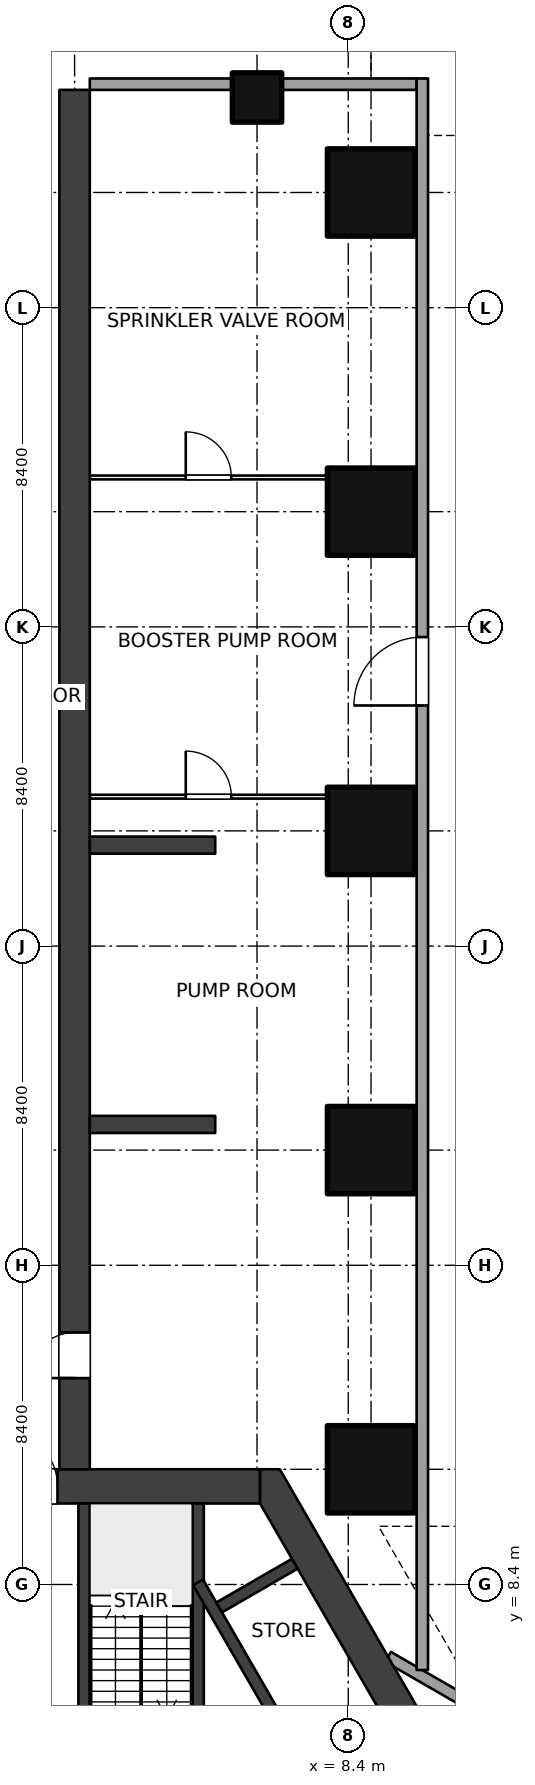
"""IFC4 building model, lengths in metres.
Left out: names, types, materials, properties, quantities, classifications, styles, units other than length and angle.
Written with IfcOpenShell. Run it as: python <this file> out.ifc"""

import sys

from ifc_helpers import new_model, si_unit, direction, frame, frame_2d, origin, origin_2d, place, context, subcontext, project, spatial, polyline, rectangle, outline, extrude, element, fill, save


model = new_model("IFC4")
c1 = context("Model", 3, precision=1e-05, world=origin(), true_north=direction((0.0, 1.0)))
c2 = subcontext(c1, "Body", "Model", "MODEL_VIEW")
j1 = project(units=[si_unit("LENGTHUNIT", "METRE"), si_unit("PLANEANGLEUNIT", "RADIAN")], contexts=[c1])
p1 = place(None, origin())
s1 = spatial("IfcSite", under=j1, at=p1, CompositionType="ELEMENT")
p2 = place(p1, origin())
s2 = spatial("IfcBuilding", under=s1, at=p2, CompositionType="ELEMENT")
p3 = place(p2, frame((0.0, 0.0, -10.5)))
s3 = spatial("IfcBuildingStorey", under=s2, at=p3, CompositionType="ELEMENT", Elevation=-10.5)
for number, where, z_axis, x_axis in (
    (1, (9.0, 11.432, 0.0), (0.0, 0.0, 1.0), (1.0, 0.0, 0.0)),
    (2, (9.0, 19.832, 0.0), (0.0, 0.0, 1.0), (1.0, 0.0, 0.0)),
    (3, (9.0, 28.231, 0.0), (0.0, 0.0, 1.0), (1.0, 0.0, 0.0)),
    (4, (9.0, 36.632, 0.0), (0.0, 0.0, 1.0), (1.0, 0.0, 0.0)),
    (5, (9.0, 45.031, 0.0), (0.0, 0.0, 1.0), (1.0, 0.0, 0.0)),
):
    element("IfcColumn", number, at=place(p3, frame(where, z_axis=z_axis, x_axis=x_axis)), inside=s3, PredefinedType="COLUMN", context=c2, shape_type="SweptSolid", body=[
        extrude(rectangle(XDim=2.3, YDim=2.3, at=origin_2d()), origin(), (0.0, 0.0, 1.0), 3.5),
    ])
p4 = place(p3, frame((6.0, 47.531, 0.0), z_axis=(0.0, 0.0, 1.0), x_axis=(1.0, 0.0, 0.0)))
e6 = element("IfcColumn", 6, at=p4, inside=s3, PredefinedType="COLUMN", context=c2, shape_type="SweptSolid", body=[
    extrude(rectangle(XDim=1.3, YDim=1.3, at=origin_2d()), origin(), (0.0, 0.0, 1.0), 3.5),
])
p5 = place(p3, frame((-6.08, 10.981, 0.0), z_axis=(0.0, 0.0, 1.0), x_axis=(1.0, 0.0, 0.0)))
e7 = element("IfcWall", 7, at=p5, inside=s3, PredefinedType="SHEAR", context=c2, shape_type="SweptSolid", body=[
    extrude(rectangle(XDim=12.161, YDim=0.9, at=frame_2d((6.08, 0.0))), origin(), (0.0, 0.0, 1.0), 3.5),
])
p6 = place(p5, frame((5.33, 0.0, 0.0)))
e8 = element("IfcOpeningElement", 8, at=p6, cuts=e7, PredefinedType="OPENING", context=c2, shape_type="SweptSolid", body=[
    extrude(rectangle(XDim=1.5, YDim=2.1, at=frame_2d((0.75, 1.05))), frame((0.0, 0.46, 0.0), z_axis=(0.0, -1.0, 0.0), x_axis=(1.0, 0.0, 0.0)), (0.0, 0.0, 1.0), 0.92),
])
p7 = place(p3, origin())
e9 = element("IfcWall", 9, at=p7, inside=s3, PredefinedType="SHEAR", context=c2, shape_type="SweptSolid", body=[
    extrude(outline(polyline([(13.2, 0.0), (6.6, 11.432), (6.08, 11.432), (6.08, 10.531), (12.161, 0.0), (12.94, -0.45), (13.2, 0.0)])), origin(), (0.0, 0.0, 1.0), 3.5),
])
p8 = place(p3, frame((1.45, 3.63, 0.0), z_axis=(0.0, 0.0, 1.0), x_axis=(0.0, 1.0, 0.0)))
e10 = element("IfcWall", 10, at=p8, inside=s3, PredefinedType="SHEAR", context=c2, shape_type="SweptSolid", body=[
    extrude(rectangle(XDim=6.902, YDim=0.3, at=frame_2d((3.451, 0.0))), origin(), (0.0, 0.0, 1.0), 3.5),
])
p9 = place(p8, frame((0.25, 0.0, 0.0)))
e11 = element("IfcOpeningElement", 11, at=p9, cuts=e10, PredefinedType="OPENING", context=c2, shape_type="SweptSolid", body=[
    extrude(rectangle(XDim=1.0, YDim=2.1, at=frame_2d((0.5, 1.05))), frame((0.0, 0.16, 0.0), z_axis=(0.0, -1.0, 0.0), x_axis=(1.0, 0.0, 0.0)), (0.0, 0.0, 1.0), 0.32),
])
p10 = place(p3, frame((4.45, 3.63, 0.0), z_axis=(0.0, 0.0, 1.0), x_axis=(0.0, 1.0, 0.0)))
e12 = element("IfcWall", 12, at=p10, inside=s3, PredefinedType="SHEAR", context=c2, shape_type="SweptSolid", body=[
    extrude(rectangle(XDim=6.902, YDim=0.3, at=frame_2d((3.451, 0.0))), origin(), (0.0, 0.0, 1.0), 3.5),
])
p11 = place(p3, frame((4.45, 8.455, 0.0), z_axis=(0.0, 0.0, 1.0), x_axis=(0.500002290144, -0.866024081565, 0.0)))
e13 = element("IfcWall", 13, at=p11, inside=s3, PredefinedType="SHEAR", context=c2, shape_type="SweptSolid", body=[
    extrude(rectangle(XDim=10.195, YDim=0.3, at=frame_2d((5.098, 0.0))), origin(), (0.0, 0.0, 1.0), 3.5),
])
p12 = place(p11, frame((4.648, 0.0, 0.0)))
e14 = element("IfcOpeningElement", 14, at=p12, cuts=e13, PredefinedType="OPENING", context=c2, shape_type="SweptSolid", body=[
    extrude(rectangle(XDim=0.9, YDim=2.1, at=frame_2d((0.45, 1.05))), frame((0.0, 0.16, 0.0), z_axis=(0.0, -1.0, 0.0), x_axis=(1.0, 0.0, 0.0)), (0.0, 0.0, 1.0), 0.32),
])
p13 = place(p3, frame((5.004, 7.796, 0.0), z_axis=(0.0, 0.0, 1.0), x_axis=(0.866053019151, 0.499952165731, 0.0)))
e15 = element("IfcWall", 15, at=p13, inside=s3, PredefinedType="SHEAR", context=c2, shape_type="SweptSolid", body=[
    extrude(rectangle(XDim=2.3, YDim=0.3, at=frame_2d((1.15, 0.0))), origin(), (0.0, 0.0, 1.0), 3.5),
])
p14 = place(p3, frame((1.2, 10.981, 0.0), z_axis=(0.0, 0.0, 1.0), x_axis=(0.0, 1.0, 0.0)))
e16 = element("IfcWall", 16, at=p14, inside=s3, PredefinedType="SHEAR", context=c2, shape_type="SweptSolid", body=[
    extrude(rectangle(XDim=36.75, YDim=0.8, at=frame_2d((18.375, 0.0))), origin(), (0.0, 0.0, 1.0), 3.5),
])
p15 = place(p14, frame((2.85, 0.0, 0.0)))
e17 = element("IfcOpeningElement", 17, at=p15, cuts=e16, PredefinedType="OPENING", context=c2, shape_type="SweptSolid", body=[
    extrude(rectangle(XDim=1.2, YDim=2.1, at=frame_2d((0.6, 1.05))), frame((0.0, 0.41, 0.0), z_axis=(0.0, -1.0, 0.0), x_axis=(1.0, 0.0, 0.0)), (0.0, 0.0, 1.0), 0.82),
])
p16 = place(p3, frame((1.6, 29.132, 0.0), z_axis=(0.0, 0.0, 1.0), x_axis=(1.0, 0.0, 0.0)))
e18 = element("IfcWall", 18, at=p16, inside=s3, PredefinedType="PARTITIONING", context=c2, shape_type="SweptSolid", body=[
    extrude(rectangle(XDim=8.6, YDim=0.1, at=frame_2d((4.3, 0.0))), origin(), (0.0, 0.0, 1.0), 3.2),
])
p17 = place(p16, frame((2.525, 0.0, 0.0)))
e19 = element("IfcOpeningElement", 19, at=p17, cuts=e18, PredefinedType="OPENING", context=c2, shape_type="SweptSolid", body=[
    extrude(rectangle(XDim=1.2, YDim=2.1, at=frame_2d((0.6, 1.05))), frame((0.0, 0.06, 0.0), z_axis=(0.0, -1.0, 0.0), x_axis=(1.0, 0.0, 0.0)), (0.0, 0.0, 1.0), 0.12),
])
p18 = place(p3, frame((1.6, 37.531, 0.0), z_axis=(0.0, 0.0, 1.0), x_axis=(1.0, 0.0, 0.0)))
e20 = element("IfcWall", 20, at=p18, inside=s3, PredefinedType="PARTITIONING", context=c2, shape_type="SweptSolid", body=[
    extrude(rectangle(XDim=8.6, YDim=0.1, at=frame_2d((4.3, 0.0))), origin(), (0.0, 0.0, 1.0), 3.2),
])
p19 = place(p18, frame((2.525, 0.0, 0.0)))
e21 = element("IfcOpeningElement", 21, at=p19, cuts=e20, PredefinedType="OPENING", context=c2, shape_type="SweptSolid", body=[
    extrude(rectangle(XDim=1.2, YDim=2.1, at=frame_2d((0.6, 1.05))), frame((0.0, 0.06, 0.0), z_axis=(0.0, -1.0, 0.0), x_axis=(1.0, 0.0, 0.0)), (0.0, 0.0, 1.0), 0.12),
])
p20 = place(p3, frame((1.6, 47.882, 0.0), z_axis=(0.0, 0.0, 1.0), x_axis=(1.0, 0.0, 0.0)))
e22 = element("IfcWall", 22, at=p20, inside=s3, PredefinedType="SOLIDWALL", context=c2, shape_type="SweptSolid", body=[
    extrude(rectangle(XDim=8.6, YDim=0.3, at=frame_2d((4.3, 0.0))), origin(), (0.0, 0.0, 1.0), 1.9),
])
p21 = place(p3, frame((10.35, 6.149, 0.0), z_axis=(0.0, 0.0, 1.0), x_axis=(0.0, 1.0, 0.0)))
e23 = element("IfcWall", 23, at=p21, inside=s3, PredefinedType="SOLIDWALL", context=c2, shape_type="SweptSolid", body=[
    extrude(rectangle(XDim=41.883, YDim=0.3, at=frame_2d((20.941, 0.0))), origin(), (0.0, 0.0, 1.0), 3.2),
])
p22 = place(p21, frame((25.383, 0.0, 0.0)))
e24 = element("IfcOpeningElement", 24, at=p22, cuts=e23, PredefinedType="OPENING", context=c2, shape_type="SweptSolid", body=[
    extrude(rectangle(XDim=1.8, YDim=2.4, at=frame_2d((0.9, 1.2))), frame((0.0, 0.16, 0.0), z_axis=(0.0, -1.0, 0.0), x_axis=(1.0, 0.0, 0.0)), (0.0, 0.0, 1.0), 0.32),
])
p23 = place(p3, frame((9.45, 6.495, 0.0), z_axis=(0.0, 0.0, 1.0), x_axis=(0.866025301493, -0.500000177174, 0.0)))
e25 = element("IfcWall", 25, at=p23, inside=s3, PredefinedType="SOLIDWALL", context=c2, shape_type="SweptSolid", body=[
    extrude(rectangle(XDim=43.095, YDim=0.3, at=frame_2d((21.548, 0.0))), origin(), (0.0, 0.0, 1.0), 3.2),
])
p24 = place(p23, frame((26.595, 0.0, 0.0)))
e26 = element("IfcOpeningElement", 26, at=p24, cuts=e25, PredefinedType="OPENING", context=c2, shape_type="SweptSolid", body=[
    extrude(rectangle(XDim=1.8, YDim=2.4, at=frame_2d((0.9, 1.2))), frame((0.0, 0.16, 0.0), z_axis=(0.0, -1.0, 0.0), x_axis=(1.0, 0.0, 0.0)), (0.0, 0.0, 1.0), 0.32),
])
for number, where, z_axis, x_axis in (
    (27, (1.6, 20.507, 0.0), (0.0, 0.0, 1.0), (1.0, 0.0, 0.0)),
    (28, (1.6, 27.856, 0.0), (0.0, 0.0, 1.0), (1.0, 0.0, 0.0)),
):
    element("IfcWall", number, at=place(p3, frame(where, z_axis=z_axis, x_axis=x_axis)), inside=s3, PredefinedType="SOLIDWALL", context=c2, shape_type="SweptSolid", body=[
        extrude(rectangle(XDim=3.3, YDim=0.45, at=frame_2d((1.65, 0.0))), origin(), (0.0, 0.0, 1.0), 3.5),
    ])
p25 = place(p6, origin())
e29 = element("IfcDoor", 29, at=p25, inside=s3, OperationType="DOUBLE_DOOR_DOUBLE_SWING", PredefinedType="DOOR", context=c2, shape_type="SweptSolid", body=[
    extrude(rectangle(XDim=1.5, YDim=2.1, at=frame_2d((0.75, 1.05))), frame((0.0, 0.025, 0.0), z_axis=(0.0, -1.0, 0.0), x_axis=(1.0, 0.0, 0.0)), (0.0, 0.0, 1.0), 0.05),
])
fill(e8, e29)
p26 = place(p17, origin())
e30 = element("IfcDoor", 30, at=p26, inside=s3, OperationType="DOUBLE_SWING_LEFT", PredefinedType="DOOR", context=c2, shape_type="SweptSolid", body=[
    extrude(rectangle(XDim=1.2, YDim=2.1, at=frame_2d((0.6, 1.05))), frame((0.0, 0.025, 0.0), z_axis=(0.0, -1.0, 0.0), x_axis=(1.0, 0.0, 0.0)), (0.0, 0.0, 1.0), 0.05),
])
fill(e19, e30)
p27 = place(p19, origin())
e31 = element("IfcDoor", 31, at=p27, inside=s3, OperationType="DOUBLE_SWING_LEFT", PredefinedType="DOOR", context=c2, shape_type="SweptSolid", body=[
    extrude(rectangle(XDim=1.2, YDim=2.1, at=frame_2d((0.6, 1.05))), frame((0.0, 0.025, 0.0), z_axis=(0.0, -1.0, 0.0), x_axis=(1.0, 0.0, 0.0)), (0.0, 0.0, 1.0), 0.05),
])
fill(e21, e31)
p28 = place(p15, origin())
e32 = element("IfcDoor", 32, at=p28, inside=s3, OperationType="DOUBLE_SWING_LEFT", PredefinedType="DOOR", context=c2, shape_type="SweptSolid", body=[
    extrude(rectangle(XDim=1.2, YDim=2.1, at=frame_2d((0.6, 1.05))), frame((0.0, 0.025, 0.0), z_axis=(0.0, -1.0, 0.0), x_axis=(1.0, 0.0, 0.0)), (0.0, 0.0, 1.0), 0.05),
])
fill(e17, e32)
p29 = place(p22, origin())
e33 = element("IfcDoor", 33, at=p29, inside=s3, OperationType="DOUBLE_DOOR_DOUBLE_SWING", PredefinedType="DOOR", context=c2, shape_type="SweptSolid", body=[
    extrude(rectangle(XDim=1.8, YDim=2.4, at=frame_2d((0.9, 1.2))), frame((0.0, 0.025, 0.0), z_axis=(0.0, -1.0, 0.0), x_axis=(1.0, 0.0, 0.0)), (0.0, 0.0, 1.0), 0.05),
])
fill(e24, e33)
save(model, sys.argv[1])
